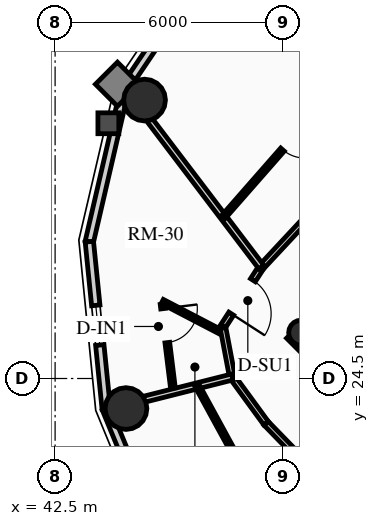
"""IFC4 building model, lengths in metres.
Left out: names, types, materials, properties, quantities, classifications, styles, units other than length and angle.
Written with IfcOpenShell. Run it as: python <this file> out.ifc"""

import sys

from ifc_helpers import new_model, si_unit, direction, frame, frame_2d, origin, origin_2d, place, context, subcontext, project, spatial, rectangle, circle, hollow_circle, extrude, source, transform, mapped, element, fill, save


model = new_model("IFC4")
c1 = context("Model", 3, precision=1e-05, world=origin(), true_north=direction((0.0, 1.0)))
c2 = subcontext(c1, "Body", "Model", "MODEL_VIEW")
j1 = project(units=[si_unit("LENGTHUNIT", "METRE"), si_unit("PLANEANGLEUNIT", "RADIAN")], contexts=[c1])
p1 = place(None, origin())
s1 = spatial("IfcSite", under=j1, at=p1, CompositionType="ELEMENT")
p2 = place(p1, origin())
s2 = spatial("IfcBuilding", under=s1, at=p2, CompositionType="ELEMENT")
p3 = place(p2, frame((0.0, 0.0, 214.12)))
s3 = spatial("IfcBuildingStorey", under=s2, at=p3, CompositionType="ELEMENT", Elevation=214.12)
p4 = place(p3, frame((58.702, 15.732, 0.0), z_axis=(0.0, 0.0, 1.0), x_axis=(-0.707106781187, 0.707106781187, 0.0)))
e1 = element("IfcWall", 1, at=p4, inside=s3, PredefinedType="SHEAR", context=c2, shape_type="SweptSolid", body=[
    extrude(rectangle(XDim=14.1, YDim=0.4, at=frame_2d((7.05, 0.0))), origin(), (0.0, 0.0, 1.0), 2.91),
])
p5 = place(p3, frame((48.873, 25.561, 0.0), z_axis=(0.0, 0.0, 1.0), x_axis=(0.707106781187, 0.707106781187, 0.0)))
e2 = element("IfcWall", 2, at=p5, inside=s3, PredefinedType="SHEAR", context=c2, shape_type="SweptSolid", body=[
    extrude(rectangle(XDim=10.7, YDim=0.4, at=frame_2d((5.35, 0.0))), origin(), (0.0, 0.0, 1.0), 2.91),
])
m1 = source(origin(), c2, "Body", "SweptSolid", [
    extrude(rectangle(XDim=1.5, YDim=2.02, at=frame_2d((0.75, 1.01))), frame((0.0, 0.21, 0.0), z_axis=(0.0, -1.0, 0.0), x_axis=(1.0, 0.0, 0.0)), (0.0, 0.0, 1.0), 0.42),
])
p6 = place(p5, frame((4.6, 0.0, 0.0)))
e3 = element("IfcOpeningElement", 3, at=p6, cuts=e2, PredefinedType="OPENING", context=c2, shape_type="MappedRepresentation", body=[
    mapped(m1, transform((0.0, 0.0, 0.0), x_axis=(1.0, 0.0, 0.0), y_axis=(0.0, 1.0, 0.0), z_axis=(0.0, 0.0, 1.0), scale=1.0)),
])
p7 = place(p3, frame((48.976, 25.706, 0.0), z_axis=(0.0, 0.0, 1.0), x_axis=(0.707106781187, 0.707106781187, 0.0)))
e4 = element("IfcColumn", 4, at=p7, inside=s3, PredefinedType="COLUMN", context=c2, shape_type="SweptSolid", body=[
    extrude(hollow_circle(Radius=0.33, WallThickness=0.025, at=origin_2d()), origin(), (0.0, 0.0, 1.0), 2.91),
])
for number, where, z_axis, x_axis in (
    (5, (44.854, 31.827, 0.0), (0.0, 0.0, 1.0), (1.0, 0.0, 0.0)),
    (6, (44.365, 23.709, 0.0), (0.0, 0.0, 1.0), (1.0, 0.0, 0.0)),
):
    element("IfcColumn", number, at=place(p3, frame(where, z_axis=z_axis, x_axis=x_axis)), inside=s3, PredefinedType="USERDEFINED", context=c2, shape_type="SweptSolid", body=[
        extrude(circle(Radius=0.55, at=origin_2d()), origin(), (0.0, 0.0, 1.0), 2.91),
    ])
p8 = place(p3, frame((44.337, 32.144, 0.0), z_axis=(0.0, 0.0, 1.0), x_axis=(0.559495003079, 0.828833723692, 0.0)))
e7 = element("IfcWall", 7, at=p8, inside=s3, PredefinedType="SOLIDWALL", context=c2, shape_type="SweptSolid", body=[
    extrude(rectangle(XDim=3.976, YDim=0.22, at=frame_2d((1.988, 0.0))), origin(), (0.0, 0.0, 1.0), 2.322),
])
m2 = source(origin(), c2, "Body", "SweptSolid", [
    extrude(rectangle(XDim=1.05, YDim=1.3, at=frame_2d((0.525, 0.65))), frame((0.0, 0.12, 0.0), z_axis=(0.0, -1.0, 0.0), x_axis=(1.0, 0.0, 0.0)), (0.0, 0.0, 1.0), 0.24),
])
p9 = place(p8, frame((1.463, 0.0, 0.65)))
e8 = element("IfcOpeningElement", 8, at=p9, cuts=e7, PredefinedType="OPENING", context=c2, shape_type="MappedRepresentation", body=[
    mapped(m2, transform((0.0, 0.0, 0.0), x_axis=(1.0, 0.0, 0.0), y_axis=(0.0, 1.0, 0.0), z_axis=(0.0, 0.0, 1.0), scale=1.0)),
])
p10 = place(p3, frame((43.401, 28.1, 0.0), z_axis=(0.0, 0.0, 1.0), x_axis=(0.225473813158, 0.974249228678, 0.0)))
e9 = element("IfcWall", 9, at=p10, inside=s3, PredefinedType="SOLIDWALL", context=c2, shape_type="SweptSolid", body=[
    extrude(rectangle(XDim=4.15, YDim=0.22, at=frame_2d((2.075, 0.0))), origin(), (0.0, 0.0, 1.0), 2.322),
])
p11 = place(p3, frame((43.845, 23.705, 0.0), z_axis=(0.0, 0.0, 1.0), x_axis=(-0.100570534541, 0.994929930991, 0.0)))
e10 = element("IfcWall", 10, at=p11, inside=s3, PredefinedType="SOLIDWALL", context=c2, shape_type="SweptSolid", body=[
    extrude(rectangle(XDim=4.418, YDim=0.22, at=frame_2d((2.209, 0.0))), origin(), (0.0, 0.0, 1.0), 2.322),
])
p12 = place(p11, frame((1.684, 0.0, 0.65)))
e11 = element("IfcOpeningElement", 11, at=p12, cuts=e10, PredefinedType="OPENING", context=c2, shape_type="MappedRepresentation", body=[
    mapped(m2, transform((0.0, 0.0, 0.0), x_axis=(1.0, 0.0, 0.0), y_axis=(0.0, 1.0, 0.0), z_axis=(0.0, 0.0, 1.0), scale=1.0)),
])
p13 = place(p3, frame((45.626, 19.387, 0.0), z_axis=(0.0, 0.0, 1.0), x_axis=(-0.381309704956, 0.924447353237, 0.0)))
e12 = element("IfcWall", 12, at=p13, inside=s3, PredefinedType="SOLIDWALL", context=c2, shape_type="SweptSolid", body=[
    extrude(rectangle(XDim=4.671, YDim=0.22, at=frame_2d((2.335, 0.0))), origin(), (0.0, 0.0, 1.0), 2.322),
])
p14 = place(p13, frame((1.81, 0.0, 0.65)))
e13 = element("IfcOpeningElement", 13, at=p14, cuts=e12, PredefinedType="OPENING", context=c2, shape_type="MappedRepresentation", body=[
    mapped(m2, transform((0.0, 0.0, 0.0), x_axis=(1.0, 0.0, 0.0), y_axis=(0.0, 1.0, 0.0), z_axis=(0.0, 0.0, 1.0), scale=1.0)),
])
p15 = place(p3, frame((52.212, 32.024, 0.0), z_axis=(0.0, 0.0, 1.0), x_axis=(-0.682158998173, -0.731203871169, 0.0)))
e14 = element("IfcWall", 14, at=p15, inside=s3, PredefinedType="PARTITIONING", context=c2, shape_type="SweptSolid", body=[
    extrude(rectangle(XDim=6.282, YDim=0.15, at=frame_2d((3.141, 0.0))), origin(), (0.0, 0.0, 1.0), 2.255),
])
p16 = place(p3, frame((47.927, 27.431, 0.0), z_axis=(0.0, 0.0, 1.0), x_axis=(-0.543126643356, -0.839650790077, 0.0)))
e15 = element("IfcWall", 15, at=p16, inside=s3, PredefinedType="PARTITIONING", context=c2, shape_type="SweptSolid", body=[
    extrude(rectangle(XDim=1.868, YDim=0.15, at=frame_2d((0.934, 0.0))), origin(), (0.0, 0.0, 1.0), 2.255),
])
m3 = source(origin(), c2, "Body", "SweptSolid", [
    extrude(rectangle(XDim=1.05, YDim=2.015, at=frame_2d((0.525, 1.007))), frame((0.0, 0.085, 0.0), z_axis=(0.0, -1.0, 0.0), x_axis=(1.0, 0.0, 0.0)), (0.0, 0.0, 1.0), 0.17),
])
p17 = place(p16, frame((0.409, 0.0, 0.0)))
e16 = element("IfcOpeningElement", 16, at=p17, cuts=e15, PredefinedType="OPENING", context=c2, shape_type="MappedRepresentation", body=[
    mapped(m3, transform((0.0, 0.0, 0.0), x_axis=(1.0, 0.0, 0.0), y_axis=(0.0, 1.0, 0.0), z_axis=(0.0, 0.0, 1.0), scale=1.0)),
])
p18 = place(p3, frame((46.912, 25.862, 0.0), z_axis=(0.0, 0.0, 1.0), x_axis=(0.186095172215, -0.98253172309, 0.0)))
e17 = element("IfcWall", 17, at=p18, inside=s3, PredefinedType="PARTITIONING", context=c2, shape_type="SweptSolid", body=[
    extrude(rectangle(XDim=1.346, YDim=0.15, at=frame_2d((0.673, 0.0))), origin(), (0.0, 0.0, 1.0), 2.322),
])
p19 = place(p3, frame((47.163, 24.54, 0.0), z_axis=(0.0, 0.0, 1.0), x_axis=(0.589711902124, -0.807613690135, 0.0)))
e18 = element("IfcWall", 18, at=p19, inside=s3, PredefinedType="PARTITIONING", context=c2, shape_type="SweptSolid", body=[
    extrude(rectangle(XDim=1.507, YDim=0.15, at=frame_2d((0.753, 0.0))), origin(), (0.0, 0.0, 1.0), 2.255),
])
p20 = place(p3, frame((48.052, 23.323, 0.0), z_axis=(0.0, 0.0, 1.0), x_axis=(0.696573981306, -0.717484974454, 0.0)))
e19 = element("IfcWall", 19, at=p20, inside=s3, PredefinedType="PARTITIONING", context=c2, shape_type="SweptSolid", body=[
    extrude(rectangle(XDim=5.849, YDim=0.15, at=frame_2d((2.925, 0.0))), origin(), (0.0, 0.0, 1.0), 2.685),
])
p21 = place(p3, frame((47.927, 27.431, 0.0), z_axis=(0.0, 0.0, 1.0), x_axis=(-0.604823333103, 0.796359677366, 0.0)))
e20 = element("IfcWall", 20, at=p21, inside=s3, PredefinedType="PARTITIONING", context=c2, shape_type="SweptSolid", body=[
    extrude(rectangle(XDim=5.907, YDim=0.16, at=frame_2d((2.953, 0.0))), origin(), (0.0, 0.0, 1.0), 2.322),
])
p22 = place(p3, frame((47.163, 24.54, 0.0), z_axis=(0.0, 0.0, 1.0), x_axis=(-0.9696166611, -0.244629373781, 0.0)))
e21 = element("IfcWall", 21, at=p22, inside=s3, PredefinedType="PARTITIONING", context=c2, shape_type="SweptSolid", body=[
    extrude(rectangle(XDim=3.401, YDim=0.16, at=frame_2d((1.701, 0.0))), origin(), (0.0, 0.0, 1.0), 2.322),
])
p23 = place(p3, frame((50.634, 32.977, 0.0), z_axis=(0.0, 0.0, 1.0), x_axis=(-0.659241945747, -0.751930885765, 0.0)))
e22 = element("IfcWall", 22, at=p23, inside=s3, PredefinedType="PARTITIONING", context=c2, shape_type="SweptSolid", body=[
    extrude(rectangle(XDim=5.624, YDim=0.125, at=frame_2d((2.812, 0.0))), origin(), (0.0, 0.0, 1.0), 2.255),
])
m4 = source(origin(), c2, "Body", "SweptSolid", [
    extrude(rectangle(XDim=0.9, YDim=2.005, at=frame_2d((0.45, 1.002))), frame((0.0, 0.073, 0.0), z_axis=(0.0, -1.0, 0.0), x_axis=(1.0, 0.0, 0.0)), (0.0, 0.0, 1.0), 0.145),
])
p24 = place(p23, frame((2.362, 0.0, 0.0)))
e23 = element("IfcOpeningElement", 23, at=p24, cuts=e22, PredefinedType="OPENING", context=c2, shape_type="MappedRepresentation", body=[
    mapped(m4, transform((0.0, 0.0, 0.0), x_axis=(1.0, 0.0, 0.0), y_axis=(0.0, 1.0, 0.0), z_axis=(0.0, 0.0, 1.0), scale=1.0)),
])
p25 = place(p3, frame((46.844, 25.731, 0.0), z_axis=(0.0, 0.0, 1.0), x_axis=(-0.886802533251, 0.462148533504, 0.0)))
e24 = element("IfcWall", 24, at=p25, inside=s3, PredefinedType="PARTITIONING", context=c2, shape_type="SweptSolid", body=[
    extrude(rectangle(XDim=1.719, YDim=0.125, at=frame_2d((0.859, 0.0))), origin(), (0.0, 0.0, 1.0), 2.685),
])
p26 = place(p3, frame((45.328, 26.457, 0.0), z_axis=(0.0, 0.0, 1.0), x_axis=(0.122605181354, -0.992455525203, 0.0)))
e25 = element("IfcWall", 25, at=p26, inside=s3, PredefinedType="PARTITIONING", context=c2, shape_type="SweptSolid", body=[
    extrude(rectangle(XDim=2.228, YDim=0.125, at=frame_2d((1.114, 0.0))), origin(), (0.0, 0.0, 1.0), 2.322),
])
p27 = place(p26, frame((0.12, 0.0, 0.0)))
e26 = element("IfcOpeningElement", 26, at=p27, cuts=e25, PredefinedType="OPENING", context=c2, shape_type="MappedRepresentation", body=[
    mapped(m4, transform((0.0, 0.0, 0.0), x_axis=(1.0, 0.0, 0.0), y_axis=(0.0, 1.0, 0.0), z_axis=(0.0, 0.0, 1.0), scale=1.0)),
])
p28 = place(p3, frame((46.24, 24.307, 0.0), z_axis=(0.0, 0.0, 1.0), x_axis=(0.479212341296, -0.87769899849, 0.0)))
e27 = element("IfcWall", 27, at=p28, inside=s3, PredefinedType="PARTITIONING", context=c2, shape_type="SweptSolid", body=[
    extrude(rectangle(XDim=2.374, YDim=0.125, at=frame_2d((1.187, 0.0))), origin(), (0.0, 0.0, 1.0), 2.255),
])
m5 = source(origin(), c2, "Body", "SweptSolid", [
    extrude(rectangle(XDim=1.05, YDim=1.3, at=frame_2d((0.525, 0.65))), frame((0.0, 0.03, 0.0), z_axis=(0.0, -1.0, 0.0), x_axis=(1.0, 0.0, 0.0)), (0.0, 0.0, 1.0), 0.06),
])
p29 = place(p12, origin())
e28 = element("IfcWindow", 28, at=p29, inside=s3, PartitioningType="SINGLE_PANEL", PredefinedType="WINDOW", context=c2, shape_type="MappedRepresentation", body=[
    mapped(m5, transform((0.0, 0.0, 0.0), x_axis=(1.0, 0.0, 0.0), y_axis=(0.0, 1.0, 0.0), z_axis=(0.0, 0.0, 1.0), scale=1.0)),
])
fill(e11, e28)
m6 = source(origin(), c2, "Body", "SweptSolid", [
    extrude(rectangle(XDim=0.9, YDim=2.005, at=frame_2d((0.45, 1.002))), frame((0.0, 0.025, 0.0), z_axis=(0.0, -1.0, 0.0), x_axis=(1.0, 0.0, 0.0)), (0.0, 0.0, 1.0), 0.05),
])
p30 = place(p24, origin())
e29 = element("IfcDoor", 29, at=p30, inside=s3, OperationType="SINGLE_SWING_LEFT", PredefinedType="DOOR", context=c2, shape_type="MappedRepresentation", body=[
    mapped(m6, transform((0.0, 0.0, 0.0), x_axis=(1.0, 0.0, 0.0), y_axis=(0.0, 1.0, 0.0), z_axis=(0.0, 0.0, 1.0), scale=1.0)),
])
fill(e23, e29)
m7 = source(origin(), c2, "Body", "SweptSolid", [
    extrude(rectangle(XDim=1.05, YDim=2.015, at=frame_2d((0.525, 1.007))), frame((0.0, 0.025, 0.0), z_axis=(0.0, -1.0, 0.0), x_axis=(1.0, 0.0, 0.0)), (0.0, 0.0, 1.0), 0.05),
])
p31 = place(p17, origin())
e30 = element("IfcDoor", 30, at=p31, inside=s3, OperationType="SINGLE_SWING_RIGHT", PredefinedType="DOOR", context=c2, shape_type="MappedRepresentation", body=[
    mapped(m7, transform((0.0, 0.0, 0.0), x_axis=(1.0, 0.0, 0.0), y_axis=(0.0, 1.0, 0.0), z_axis=(0.0, 0.0, 1.0), scale=1.0)),
])
fill(e16, e30)
p32 = place(p27, origin())
e31 = element("IfcDoor", 31, at=p32, inside=s3, OperationType="SINGLE_SWING_LEFT", PredefinedType="DOOR", context=c2, shape_type="MappedRepresentation", body=[
    mapped(m6, transform((0.0, 0.0, 0.0), x_axis=(1.0, 0.0, 0.0), y_axis=(0.0, 1.0, 0.0), z_axis=(0.0, 0.0, 1.0), scale=1.0)),
])
fill(e26, e31)
save(model, sys.argv[1])
